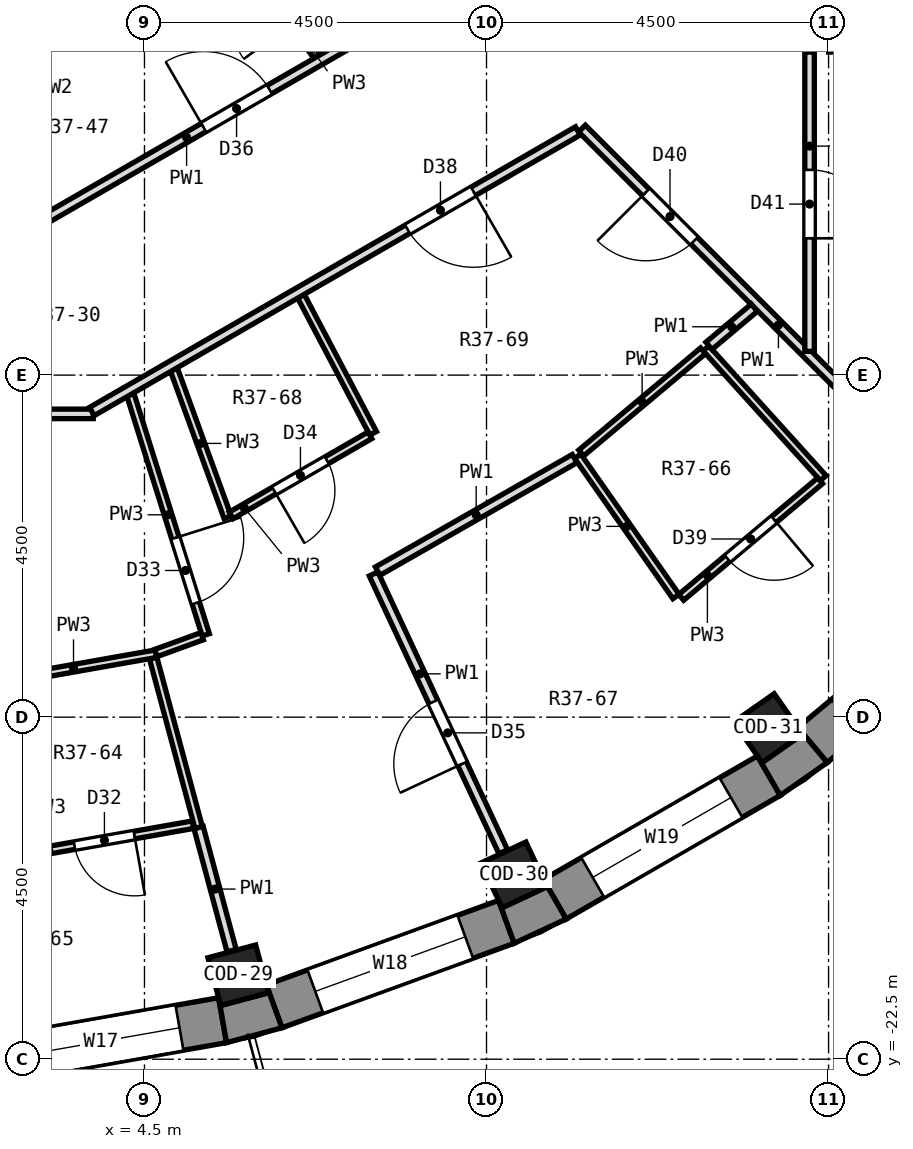
"""IFC4 building model, lengths in metres.
Left out: names, types, materials, properties, quantities, classifications, styles, units other than length and angle.
Written with IfcOpenShell. Run it as: python <this file> out.ifc"""

import sys

from ifc_helpers import new_model, si_unit, direction, frame, frame_2d, origin, origin_2d, place, context, subcontext, project, spatial, polyline, rectangle, outline, extrude, element, fill, save


model = new_model("IFC4")
c1 = context("Model", 3, precision=1e-05, world=origin(), true_north=direction((0.0, 1.0)))
c2 = subcontext(c1, "Body", "Model", "MODEL_VIEW")
j1 = project(units=[si_unit("LENGTHUNIT", "METRE"), si_unit("PLANEANGLEUNIT", "RADIAN")], contexts=[c1])
p1 = place(None, origin())
s1 = spatial("IfcSite", under=j1, at=p1, CompositionType="ELEMENT")
p2 = place(p1, origin())
s2 = spatial("IfcBuilding", under=s1, at=p2, CompositionType="ELEMENT")
p3 = place(p2, frame((0.0, 0.0, 269.3)))
s3 = spatial("IfcBuildingStorey", under=s2, at=p3, CompositionType="ELEMENT", Elevation=269.3)
for number, where, z_axis, x_axis in (
    (1, (5.733, -21.395, 0.0), (0.0, 0.0, 1.0), (0.259, -0.966, 0.0)),
    (2, (9.361, -20.075, 0.0), (0.0, 0.0, 1.0), (0.423, -0.906, 0.0)),
    (3, (12.705, -18.144, 0.0), (0.0, 0.0, 1.0), (0.574, -0.819, 0.0)),
):
    element("IfcColumn", number, at=place(p3, frame(where, z_axis=z_axis, x_axis=x_axis)), inside=s3, PredefinedType="COLUMN", context=c2, shape_type="SweptSolid", body=[
        extrude(rectangle(XDim=0.65, YDim=0.65, at=origin_2d()), origin(), (0.0, 0.0, 1.0), 3.3),
    ])
p4 = place(p3, frame((2.325, -22.551, 0.0), z_axis=(0.0, 0.0, 1.0), x_axis=(0.984806225186, 0.173656842178, 0.0)))
e4 = element("IfcWall", 4, at=p4, inside=s3, PredefinedType="SOLIDWALL", context=c2, shape_type="SweptSolid", body=[
    extrude(rectangle(XDim=3.252, YDim=0.6, at=frame_2d((1.626, 0.0))), origin(), (0.0, 0.0, 1.0), 2.9),
])
p5 = place(p4, frame((0.576, 0.0, 0.9)))
e5 = element("IfcOpeningElement", 5, at=p5, cuts=e4, PredefinedType="OPENING", context=c2, shape_type="SweptSolid", body=[
    extrude(rectangle(XDim=2.1, YDim=1.8, at=frame_2d((1.05, 0.9))), frame((0.0, 0.312, 0.0), z_axis=(0.0, -1.0, 0.0), x_axis=(1.0, 0.0, 0.0)), (0.0, 0.0, 1.0), 0.624),
])
p6 = place(p3, frame((6.206, -21.805, 0.0), z_axis=(0.0, 0.0, 1.0), x_axis=(0.939679383794, 0.342056509473, 0.0)))
e6 = element("IfcWall", 6, at=p6, inside=s3, PredefinedType="SOLIDWALL", context=c2, shape_type="SweptSolid", body=[
    extrude(rectangle(XDim=3.252, YDim=0.6, at=frame_2d((1.626, 0.0))), origin(), (0.0, 0.0, 1.0), 2.9),
])
p7 = place(p6, frame((0.576, 0.0, 0.9)))
e7 = element("IfcOpeningElement", 7, at=p7, cuts=e6, PredefinedType="OPENING", context=c2, shape_type="SweptSolid", body=[
    extrude(rectangle(XDim=2.1, YDim=1.8, at=frame_2d((1.05, 0.9))), frame((0.0, 0.312, 0.0), z_axis=(0.0, -1.0, 0.0), x_axis=(1.0, 0.0, 0.0)), (0.0, 0.0, 1.0), 0.624),
])
p8 = place(p3, frame((9.898, -20.396, 0.0), z_axis=(0.0, 0.0, 1.0), x_axis=(0.866016800201, 0.500014901547, 0.0)))
e8 = element("IfcWall", 8, at=p8, inside=s3, PredefinedType="SOLIDWALL", context=c2, shape_type="SweptSolid", body=[
    extrude(rectangle(XDim=3.252, YDim=0.6, at=frame_2d((1.626, 0.0))), origin(), (0.0, 0.0, 1.0), 2.9),
])
p9 = place(p8, frame((0.576, 0.0, 0.9)))
e9 = element("IfcOpeningElement", 9, at=p9, cuts=e8, PredefinedType="OPENING", context=c2, shape_type="SweptSolid", body=[
    extrude(rectangle(XDim=2.1, YDim=1.8, at=frame_2d((1.05, 0.9))), frame((0.0, 0.312, 0.0), z_axis=(0.0, -1.0, 0.0), x_axis=(1.0, 0.0, 0.0)), (0.0, 0.0, 1.0), 0.624),
])
p10 = place(p3, frame((13.29, -18.367, 0.0), z_axis=(0.0, 0.0, 1.0), x_axis=(0.766056773982, 0.64277291405, 0.0)))
e10 = element("IfcWall", 10, at=p10, inside=s3, PredefinedType="SOLIDWALL", context=c2, shape_type="SweptSolid", body=[
    extrude(rectangle(XDim=3.252, YDim=0.6, at=frame_2d((1.626, 0.0))), origin(), (0.0, 0.0, 1.0), 2.9),
])
p11 = place(p10, frame((0.576, 0.0, 0.9)))
e11 = element("IfcOpeningElement", 11, at=p11, cuts=e10, PredefinedType="OPENING", context=c2, shape_type="SweptSolid", body=[
    extrude(rectangle(XDim=2.1, YDim=1.8, at=frame_2d((1.05, 0.9))), frame((0.0, 0.312, 0.0), z_axis=(0.0, -1.0, 0.0), x_axis=(1.0, 0.0, 0.0)), (0.0, 0.0, 1.0), 0.624),
])
p12 = place(p3, origin())
e12 = element("IfcWall", 12, at=p12, inside=s3, PredefinedType="SOLIDWALL", context=c2, shape_type="SweptSolid", body=[
    extrude(outline(polyline([(6.309, -22.087), (6.104, -21.523), (6.131, -21.625), (5.503, -21.793), (5.476, -21.691), (5.58, -22.282), (6.309, -22.087)])), origin(), (0.0, 0.0, 1.0), 2.9),
])
p13 = place(p3, origin())
e13 = element("IfcWall", 13, at=p13, inside=s3, PredefinedType="SOLIDWALL", context=c2, shape_type="SweptSolid", body=[
    extrude(outline(polyline([(9.364, -20.975), (10.048, -20.656), (9.748, -20.136), (9.793, -20.232), (9.204, -20.507), (9.159, -20.411), (9.364, -20.975)])), origin(), (0.0, 0.0, 1.0), 2.9),
])
p14 = place(p3, origin())
e14 = element("IfcWall", 14, at=p14, inside=s3, PredefinedType="SOLIDWALL", context=c2, shape_type="SweptSolid", body=[
    extrude(outline(polyline([(12.864, -19.03), (13.482, -18.597), (13.097, -18.137), (13.157, -18.224), (12.625, -18.597), (12.564, -18.51), (12.864, -19.03)])), origin(), (0.0, 0.0, 1.0), 2.9),
])
p15 = place(p3, frame((4.615, -17.222, 0.0), z_axis=(0.0, 0.0, 1.0), x_axis=(0.259222412409, -0.965817654066, 0.0)))
e15 = element("IfcWall", 15, at=p15, inside=s3, PredefinedType="PARTITIONING", context=c2, shape_type="SweptSolid", body=[
    extrude(rectangle(XDim=2.308, YDim=0.1, at=frame_2d((1.154, 0.0))), origin(), (0.0, 0.0, 1.0), 2.9),
])
p16 = place(p3, frame((5.212, -19.452, 0.0), z_axis=(0.0, 0.0, 1.0), x_axis=(0.259221341364, -0.96581794153, 0.0)))
e16 = element("IfcWall", 16, at=p16, inside=s3, PredefinedType="PARTITIONING", context=c2, shape_type="SweptSolid", body=[
    extrude(rectangle(XDim=1.677, YDim=0.125, at=frame_2d((0.838, 0.0))), origin(), (0.0, 0.0, 1.0), 2.9),
])
p17 = place(p3, frame((4.315, -13.758, 0.0), z_axis=(0.0, 0.0, 1.0), x_axis=(0.299479577404, -0.95410271078, 0.0)))
e17 = element("IfcWall", 17, at=p17, inside=s3, PredefinedType="PARTITIONING", context=c2, shape_type="SweptSolid", body=[
    extrude(rectangle(XDim=3.312, YDim=0.1, at=frame_2d((1.656, 0.0))), origin(), (0.0, 0.0, 1.0), 2.9),
])
p18 = place(p17, frame((1.974, 0.0, 0.0)))
e18 = element("IfcOpeningElement", 18, at=p18, cuts=e17, PredefinedType="OPENING", context=c2, shape_type="SweptSolid", body=[
    extrude(rectangle(XDim=0.9, YDim=2.1, at=frame_2d((0.45, 1.05))), frame((0.0, 0.062, 0.0), z_axis=(0.0, -1.0, 0.0), x_axis=(1.0, 0.0, 0.0)), (0.0, 0.0, 1.0), 0.124),
])
p19 = place(p3, frame((4.887, -13.427, 0.0), z_axis=(0.0, 0.0, 1.0), x_axis=(0.34179045994, -0.939776186916, 0.0)))
e19 = element("IfcWall", 19, at=p19, inside=s3, PredefinedType="PARTITIONING", context=c2, shape_type="SweptSolid", body=[
    extrude(rectangle(XDim=2.068, YDim=0.1, at=frame_2d((1.034, 0.0))), origin(), (0.0, 0.0, 1.0), 2.9),
])
p20 = place(p3, frame((7.514, -16.116, 0.0), z_axis=(0.0, 0.0, 1.0), x_axis=(0.422961674659, -0.90614757174, 0.0)))
e20 = element("IfcWall", 20, at=p20, inside=s3, PredefinedType="PARTITIONING", context=c2, shape_type="SweptSolid", body=[
    extrude(rectangle(XDim=4.034, YDim=0.125, at=frame_2d((2.017, 0.0))), origin(), (0.0, 0.0, 1.0), 2.9),
])
p21 = place(p20, frame((1.857, 0.0, 0.0)))
e21 = element("IfcOpeningElement", 21, at=p21, cuts=e20, PredefinedType="OPENING", context=c2, shape_type="SweptSolid", body=[
    extrude(rectangle(XDim=0.9, YDim=2.1, at=frame_2d((0.45, 1.05))), frame((0.0, 0.074, 0.0), z_axis=(0.0, -1.0, 0.0), x_axis=(1.0, 0.0, 0.0)), (0.0, 0.0, 1.0), 0.149),
])
p22 = place(p3, frame((6.559, -12.462, 0.0), z_axis=(0.0, 0.0, 1.0), x_axis=(0.465716796336, -0.884933819904, 0.0)))
e22 = element("IfcWall", 22, at=p22, inside=s3, PredefinedType="PARTITIONING", context=c2, shape_type="SweptSolid", body=[
    extrude(rectangle(XDim=2.037, YDim=0.1, at=frame_2d((1.019, 0.0))), origin(), (0.0, 0.0, 1.0), 2.9),
])
p23 = place(p3, frame((10.199, -14.567, 0.0), z_axis=(0.0, 0.0, 1.0), x_axis=(0.573796659147, -0.818997798503, 0.0)))
e23 = element("IfcWall", 23, at=p23, inside=s3, PredefinedType="PARTITIONING", context=c2, shape_type="SweptSolid", body=[
    extrude(rectangle(XDim=2.254, YDim=0.1, at=frame_2d((1.127, 0.0))), origin(), (0.0, 0.0, 1.0), 2.9),
])
p24 = place(p3, frame((5.626, -7.733, 0.0), z_axis=(0.0, 0.0, 1.0), x_axis=(0.588655753786, -0.808383821915, 0.0)))
e24 = element("IfcWall", 24, at=p24, inside=s3, PredefinedType="PARTITIONING", context=c2, shape_type="SweptSolid", body=[
    extrude(rectangle(XDim=1.949, YDim=0.1, at=frame_2d((0.975, 0.0))), origin(), (0.0, 0.0, 1.0), 2.9),
])
p25 = place(p24, frame((0.606, 0.0, 0.0)))
e25 = element("IfcOpeningElement", 25, at=p25, cuts=e24, PredefinedType="OPENING", context=c2, shape_type="SweptSolid", body=[
    extrude(rectangle(XDim=0.8, YDim=2.1, at=frame_2d((0.4, 1.05))), frame((0.0, 0.062, 0.0), z_axis=(0.0, -1.0, 0.0), x_axis=(1.0, 0.0, 0.0)), (0.0, 0.0, 1.0), 0.124),
])
p26 = place(p3, frame((11.887, -13.148, 0.0), z_axis=(0.0, 0.0, 1.0), x_axis=(0.67055763685, -0.741857436211, 0.0)))
e26 = element("IfcWall", 26, at=p26, inside=s3, PredefinedType="PARTITIONING", context=c2, shape_type="SweptSolid", body=[
    extrude(rectangle(XDim=2.301, YDim=0.1, at=frame_2d((1.15, 0.0))), origin(), (0.0, 0.0, 1.0), 2.9),
])
p27 = place(p3, frame((10.256, -10.256, 0.0), z_axis=(0.0, 0.0, 1.0), x_axis=(0.707106781187, -0.707106781187, 0.0)))
e27 = element("IfcWall", 27, at=p27, inside=s3, PredefinedType="PARTITIONING", context=c2, shape_type="SweptSolid", body=[
    extrude(rectangle(XDim=7.311, YDim=0.125, at=frame_2d((3.655, 0.0))), origin(), (0.0, 0.0, 1.0), 2.9),
])
p28 = place(p27, frame((1.188, 0.0, 0.0)))
e28 = element("IfcOpeningElement", 28, at=p28, cuts=e27, PredefinedType="OPENING", context=c2, shape_type="SweptSolid", body=[
    extrude(rectangle(XDim=0.9, YDim=2.1, at=frame_2d((0.45, 1.05))), frame((0.0, 0.074, 0.0), z_axis=(0.0, -1.0, 0.0), x_axis=(1.0, 0.0, 0.0)), (0.0, 0.0, 1.0), 0.149),
])
p29 = place(p3, frame((-3.691, -14.01, 0.0), z_axis=(0.0, 0.0, 1.0), x_axis=(1.0, 0.0, 0.0)))
e29 = element("IfcWall", 29, at=p29, inside=s3, PredefinedType="PARTITIONING", context=c2, shape_type="SweptSolid", body=[
    extrude(rectangle(XDim=7.517, YDim=0.125, at=frame_2d((3.759, 0.0))), origin(), (0.0, 0.0, 1.0), 2.9),
])
p30 = place(p3, frame((2.796, -19.828, 0.0), z_axis=(0.0, 0.0, 1.0), x_axis=(0.984754600233, 0.173949352742, 0.0)))
e30 = element("IfcWall", 30, at=p30, inside=s3, PredefinedType="PARTITIONING", context=c2, shape_type="SweptSolid", body=[
    extrude(rectangle(XDim=2.377, YDim=0.1, at=frame_2d((1.189, 0.0))), origin(), (0.0, 0.0, 1.0), 2.9),
])
p31 = place(p30, frame((0.795, 0.0, 0.0)))
e31 = element("IfcOpeningElement", 31, at=p31, cuts=e30, PredefinedType="OPENING", context=c2, shape_type="SweptSolid", body=[
    extrude(rectangle(XDim=0.8, YDim=2.1, at=frame_2d((0.4, 1.05))), frame((0.0, 0.062, 0.0), z_axis=(0.0, -1.0, 0.0), x_axis=(1.0, 0.0, 0.0)), (0.0, 0.0, 1.0), 0.124),
])
p32 = place(p3, frame((2.48, -17.548, 0.0), z_axis=(0.0, 0.0, 1.0), x_axis=(0.984791356236, 0.173741142745, 0.0)))
e32 = element("IfcWall", 32, at=p32, inside=s3, PredefinedType="PARTITIONING", context=c2, shape_type="SweptSolid", body=[
    extrude(rectangle(XDim=2.206, YDim=0.1, at=frame_2d((1.103, 0.0))), origin(), (0.0, 0.0, 1.0), 2.9),
])
p33 = place(p3, frame((4.65, -17.156, 0.0), z_axis=(0.0, 0.0, 1.0), x_axis=(0.939771391362, 0.341803645353, 0.0)))
e33 = element("IfcWall", 33, at=p33, inside=s3, PredefinedType="PARTITIONING", context=c2, shape_type="SweptSolid", body=[
    extrude(rectangle(XDim=0.647, YDim=0.1, at=frame_2d((0.324, 0.0))), origin(), (0.0, 0.0, 1.0), 2.9),
])
p34 = place(p3, frame((7.569, -16.079, 0.0), z_axis=(0.0, 0.0, 1.0), x_axis=(0.868243142124, 0.496138938357, 0.0)))
e34 = element("IfcWall", 34, at=p34, inside=s3, PredefinedType="PARTITIONING", context=c2, shape_type="SweptSolid", body=[
    extrude(rectangle(XDim=2.984, YDim=0.125, at=frame_2d((1.492, 0.0))), origin(), (0.0, 0.0, 1.0), 2.9),
])
p35 = place(p3, frame((5.64, -15.346, 0.0), z_axis=(0.0, 0.0, 1.0), x_axis=(0.866046731735, 0.499963057087, 0.0)))
e35 = element("IfcWall", 35, at=p35, inside=s3, PredefinedType="PARTITIONING", context=c2, shape_type="SweptSolid", body=[
    extrude(rectangle(XDim=2.108, YDim=0.1, at=frame_2d((1.054, 0.0))), origin(), (0.0, 0.0, 1.0), 2.9),
])
p36 = place(p35, frame((0.653, 0.0, 0.0)))
e36 = element("IfcOpeningElement", 36, at=p36, cuts=e35, PredefinedType="OPENING", context=c2, shape_type="SweptSolid", body=[
    extrude(rectangle(XDim=0.8, YDim=2.1, at=frame_2d((0.4, 1.05))), frame((0.0, 0.062, 0.0), z_axis=(0.0, -1.0, 0.0), x_axis=(1.0, 0.0, 0.0)), (0.0, 0.0, 1.0), 0.124),
])
p37 = place(p3, frame((3.808, -13.979, 0.0), z_axis=(0.0, 0.0, 1.0), x_axis=(0.866028642731, 0.499994389938, 0.0)))
e37 = element("IfcWall", 37, at=p37, inside=s3, PredefinedType="PARTITIONING", context=c2, shape_type="SweptSolid", body=[
    extrude(rectangle(XDim=7.383, YDim=0.125, at=frame_2d((3.691, 0.0))), origin(), (0.0, 0.0, 1.0), 2.9),
])
p38 = place(p37, frame((4.795, 0.0, 0.0)))
e38 = element("IfcOpeningElement", 38, at=p38, cuts=e37, PredefinedType="OPENING", context=c2, shape_type="SweptSolid", body=[
    extrude(rectangle(XDim=1.0, YDim=2.1, at=frame_2d((0.5, 1.05))), frame((0.0, 0.074, 0.0), z_axis=(0.0, -1.0, 0.0), x_axis=(1.0, 0.0, 0.0)), (0.0, 0.0, 1.0), 0.149),
])
p39 = place(p3, frame((3.149, -11.472, 0.0), z_axis=(0.0, 0.0, 1.0), x_axis=(0.866047390407, 0.499961916119, 0.0)))
e39 = element("IfcWall", 39, at=p39, inside=s3, PredefinedType="PARTITIONING", context=c2, shape_type="SweptSolid", body=[
    extrude(rectangle(XDim=6.031, YDim=0.125, at=frame_2d((3.015, 0.0))), origin(), (0.0, 0.0, 1.0), 2.9),
])
p40 = place(p39, frame((2.459, 0.0, 0.0)))
e40 = element("IfcOpeningElement", 40, at=p40, cuts=e39, PredefinedType="OPENING", context=c2, shape_type="SweptSolid", body=[
    extrude(rectangle(XDim=1.0, YDim=2.1, at=frame_2d((0.5, 1.05))), frame((0.0, 0.074, 0.0), z_axis=(0.0, -1.0, 0.0), x_axis=(1.0, 0.0, 0.0)), (0.0, 0.0, 1.0), 0.149),
])
p41 = place(p3, frame((11.561, -16.424, 0.0), z_axis=(0.0, 0.0, 1.0), x_axis=(0.765894211942, 0.642966605753, 0.0)))
e41 = element("IfcWall", 41, at=p41, inside=s3, PredefinedType="PARTITIONING", context=c2, shape_type="SweptSolid", body=[
    extrude(rectangle(XDim=2.387, YDim=0.1, at=frame_2d((1.194, 0.0))), origin(), (0.0, 0.0, 1.0), 2.9),
])
p42 = place(p41, frame((0.794, 0.0, 0.0)))
e42 = element("IfcOpeningElement", 42, at=p42, cuts=e41, PredefinedType="OPENING", context=c2, shape_type="SweptSolid", body=[
    extrude(rectangle(XDim=0.8, YDim=2.1, at=frame_2d((0.4, 1.05))), frame((0.0, 0.062, 0.0), z_axis=(0.0, -1.0, 0.0), x_axis=(1.0, 0.0, 0.0)), (0.0, 0.0, 1.0), 0.124),
])
p43 = place(p3, frame((10.246, -14.525, 0.0), z_axis=(0.0, 0.0, 1.0), x_axis=(0.766084035901, 0.642740421895, 0.0)))
e43 = element("IfcWall", 43, at=p43, inside=s3, PredefinedType="PARTITIONING", context=c2, shape_type="SweptSolid", body=[
    extrude(rectangle(XDim=2.092, YDim=0.1, at=frame_2d((1.046, 0.0))), origin(), (0.0, 0.0, 1.0), 2.9),
])
p44 = place(p3, frame((11.926, -13.115, 0.0), z_axis=(0.0, 0.0, 1.0), x_axis=(0.765365590348, 0.643595768407, 0.0)))
e44 = element("IfcWall", 44, at=p44, inside=s3, PredefinedType="PARTITIONING", context=c2, shape_type="SweptSolid", body=[
    extrude(rectangle(XDim=0.78, YDim=0.125, at=frame_2d((0.39, 0.0))), origin(), (0.0, 0.0, 1.0), 2.9),
])
p45 = place(p3, frame((13.25, -13.188, 0.0), z_axis=(0.0, 0.0, 1.0), x_axis=(0.0, 1.0, 0.0)))
e45 = element("IfcWall", 45, at=p45, inside=s3, PredefinedType="PARTITIONING", context=c2, shape_type="SweptSolid", body=[
    extrude(rectangle(XDim=3.938, YDim=0.125, at=frame_2d((1.969, 0.0))), origin(), (0.0, 0.0, 1.0), 2.9),
])
p46 = place(p45, frame((1.488, 0.0, 0.0)))
e46 = element("IfcOpeningElement", 46, at=p46, cuts=e45, PredefinedType="OPENING", context=c2, shape_type="SweptSolid", body=[
    extrude(rectangle(XDim=0.9, YDim=2.1, at=frame_2d((0.45, 1.05))), frame((0.0, 0.074, 0.0), z_axis=(0.0, -1.0, 0.0), x_axis=(1.0, 0.0, 0.0)), (0.0, 0.0, 1.0), 0.149),
])
p47 = place(p5, origin())
e47 = element("IfcWindow", 47, at=p47, inside=s3, PartitioningType="SINGLE_PANEL", PredefinedType="WINDOW", context=c2, shape_type="SweptSolid", body=[
    extrude(rectangle(XDim=2.1, YDim=1.8, at=frame_2d((1.05, 0.9))), frame((0.0, 0.18, 0.0), z_axis=(0.0, -1.0, 0.0), x_axis=(1.0, 0.0, 0.0)), (0.0, 0.0, 1.0), 0.06),
])
fill(e5, e47)
p48 = place(p7, origin())
e48 = element("IfcWindow", 48, at=p48, inside=s3, PartitioningType="SINGLE_PANEL", PredefinedType="WINDOW", context=c2, shape_type="SweptSolid", body=[
    extrude(rectangle(XDim=2.1, YDim=1.8, at=frame_2d((1.05, 0.9))), frame((0.0, 0.18, 0.0), z_axis=(0.0, -1.0, 0.0), x_axis=(1.0, 0.0, 0.0)), (0.0, 0.0, 1.0), 0.06),
])
fill(e7, e48)
p49 = place(p9, origin())
e49 = element("IfcWindow", 49, at=p49, inside=s3, PartitioningType="SINGLE_PANEL", PredefinedType="WINDOW", context=c2, shape_type="SweptSolid", body=[
    extrude(rectangle(XDim=2.1, YDim=1.8, at=frame_2d((1.05, 0.9))), frame((0.0, 0.18, 0.0), z_axis=(0.0, -1.0, 0.0), x_axis=(1.0, 0.0, 0.0)), (0.0, 0.0, 1.0), 0.06),
])
fill(e9, e49)
p50 = place(p31, frame((0.8, 0.0, 0.0), z_axis=(0.0, 0.0, 1.0), x_axis=(-1.0, 0.0, 0.0)))
e50 = element("IfcDoor", 50, at=p50, inside=s3, OperationType="SINGLE_SWING_LEFT", PredefinedType="DOOR", context=c2, shape_type="SweptSolid", body=[
    extrude(rectangle(XDim=0.8, YDim=2.1, at=frame_2d((0.4, 1.05))), frame((0.0, 0.025, 0.0), z_axis=(0.0, -1.0, 0.0), x_axis=(1.0, 0.0, 0.0)), (0.0, 0.0, 1.0), 0.05),
])
fill(e31, e50)
p51 = place(p18, origin())
e51 = element("IfcDoor", 51, at=p51, inside=s3, OperationType="SINGLE_SWING_LEFT", PredefinedType="DOOR", context=c2, shape_type="SweptSolid", body=[
    extrude(rectangle(XDim=0.9, YDim=2.1, at=frame_2d((0.45, 1.05))), frame((0.0, 0.025, 0.0), z_axis=(0.0, -1.0, 0.0), x_axis=(1.0, 0.0, 0.0)), (0.0, 0.0, 1.0), 0.05),
])
fill(e18, e51)
p52 = place(p36, frame((0.8, 0.0, 0.0), z_axis=(0.0, 0.0, 1.0), x_axis=(-1.0, 0.0, 0.0)))
e52 = element("IfcDoor", 52, at=p52, inside=s3, OperationType="SINGLE_SWING_RIGHT", PredefinedType="DOOR", context=c2, shape_type="SweptSolid", body=[
    extrude(rectangle(XDim=0.8, YDim=2.1, at=frame_2d((0.4, 1.05))), frame((0.0, 0.025, 0.0), z_axis=(0.0, -1.0, 0.0), x_axis=(1.0, 0.0, 0.0)), (0.0, 0.0, 1.0), 0.05),
])
fill(e36, e52)
p53 = place(p21, frame((0.9, 0.0, 0.0), z_axis=(0.0, 0.0, 1.0), x_axis=(-1.0, 0.0, 0.0)))
e53 = element("IfcDoor", 53, at=p53, inside=s3, OperationType="SINGLE_SWING_LEFT", PredefinedType="DOOR", context=c2, shape_type="SweptSolid", body=[
    extrude(rectangle(XDim=0.9, YDim=2.1, at=frame_2d((0.45, 1.05))), frame((0.0, 0.025, 0.0), z_axis=(0.0, -1.0, 0.0), x_axis=(1.0, 0.0, 0.0)), (0.0, 0.0, 1.0), 0.05),
])
fill(e21, e53)
p54 = place(p40, origin())
e54 = element("IfcDoor", 54, at=p54, inside=s3, OperationType="SINGLE_SWING_LEFT", PredefinedType="DOOR", context=c2, shape_type="SweptSolid", body=[
    extrude(rectangle(XDim=1.0, YDim=2.1, at=frame_2d((0.5, 1.05))), frame((0.0, 0.025, 0.0), z_axis=(0.0, -1.0, 0.0), x_axis=(1.0, 0.0, 0.0)), (0.0, 0.0, 1.0), 0.05),
])
fill(e40, e54)
p55 = place(p38, frame((1.0, 0.0, 0.0), z_axis=(0.0, 0.0, 1.0), x_axis=(-1.0, 0.0, 0.0)))
e55 = element("IfcDoor", 55, at=p55, inside=s3, OperationType="SINGLE_SWING_LEFT", PredefinedType="DOOR", context=c2, shape_type="SweptSolid", body=[
    extrude(rectangle(XDim=1.0, YDim=2.1, at=frame_2d((0.5, 1.05))), frame((0.0, 0.025, 0.0), z_axis=(0.0, -1.0, 0.0), x_axis=(1.0, 0.0, 0.0)), (0.0, 0.0, 1.0), 0.05),
])
fill(e38, e55)
p56 = place(p42, frame((0.8, 0.0, 0.0), z_axis=(0.0, 0.0, 1.0), x_axis=(-1.0, 0.0, 0.0)))
e56 = element("IfcDoor", 56, at=p56, inside=s3, OperationType="SINGLE_SWING_LEFT", PredefinedType="DOOR", context=c2, shape_type="SweptSolid", body=[
    extrude(rectangle(XDim=0.8, YDim=2.1, at=frame_2d((0.4, 1.05))), frame((0.0, 0.025, 0.0), z_axis=(0.0, -1.0, 0.0), x_axis=(1.0, 0.0, 0.0)), (0.0, 0.0, 1.0), 0.05),
])
fill(e42, e56)
p57 = place(p28, frame((0.9, 0.0, 0.0), z_axis=(0.0, 0.0, 1.0), x_axis=(-1.0, 0.0, 0.0)))
e57 = element("IfcDoor", 57, at=p57, inside=s3, OperationType="SINGLE_SWING_RIGHT", PredefinedType="DOOR", context=c2, shape_type="SweptSolid", body=[
    extrude(rectangle(XDim=0.9, YDim=2.1, at=frame_2d((0.45, 1.05))), frame((0.0, 0.025, 0.0), z_axis=(0.0, -1.0, 0.0), x_axis=(1.0, 0.0, 0.0)), (0.0, 0.0, 1.0), 0.05),
])
fill(e28, e57)
p58 = place(p46, frame((0.9, 0.0, 0.0), z_axis=(0.0, 0.0, 1.0), x_axis=(-1.0, 0.0, 0.0)))
e58 = element("IfcDoor", 58, at=p58, inside=s3, OperationType="SINGLE_SWING_RIGHT", PredefinedType="DOOR", context=c2, shape_type="SweptSolid", body=[
    extrude(rectangle(XDim=0.9, YDim=2.1, at=frame_2d((0.45, 1.05))), frame((0.0, 0.025, 0.0), z_axis=(0.0, -1.0, 0.0), x_axis=(1.0, 0.0, 0.0)), (0.0, 0.0, 1.0), 0.05),
])
fill(e46, e58)
save(model, sys.argv[1])
